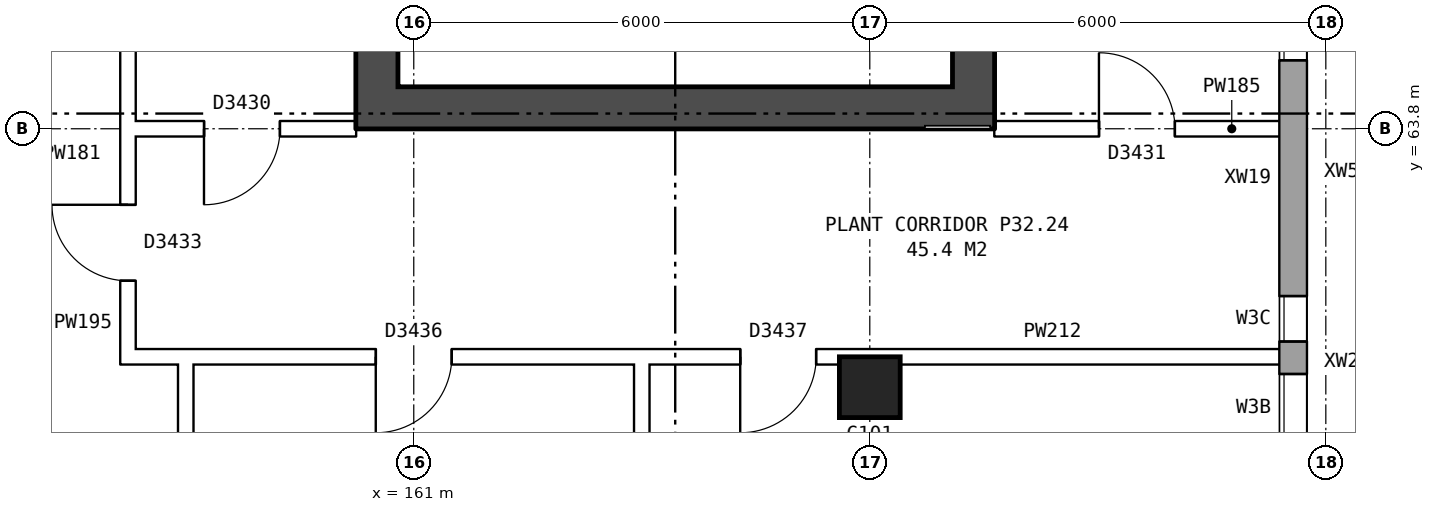
"""IFC4 building model, lengths in metres.
Left out: names, types, materials, properties, quantities, classifications, styles, units other than length and angle.
Written with IfcOpenShell. Run it as: python <this file> out.ifc"""

import sys

from ifc_helpers import new_model, si_unit, direction, frame, frame_2d, origin, origin_2d, place, context, subcontext, project, spatial, rectangle, extrude, element, fill, save


model = new_model("IFC4")
c1 = context("Model", 3, precision=1e-05, world=origin(), true_north=direction((0.0, 1.0)))
c2 = subcontext(c1, "Body", "Model", "MODEL_VIEW")
j1 = project(units=[si_unit("LENGTHUNIT", "METRE"), si_unit("PLANEANGLEUNIT", "RADIAN")], contexts=[c1])
p1 = place(None, origin())
s1 = spatial("IfcSite", under=j1, at=p1, CompositionType="ELEMENT")
p2 = place(p1, origin())
s2 = spatial("IfcBuilding", under=s1, at=p2, CompositionType="ELEMENT")
p3 = place(p2, frame((0.0, 0.0, 115.0)))
s3 = spatial("IfcBuildingStorey", under=s2, at=p3, CompositionType="ELEMENT", Elevation=115.0)
p4 = place(p3, frame((167.0, 60.4, 0.0), z_axis=(0.0, 0.0, 1.0), x_axis=(1.0, 0.0, 0.0)))
e1 = element("IfcColumn", 1, at=p4, inside=s3, PredefinedType="COLUMN", context=c2, shape_type="SweptSolid", body=[
    extrude(rectangle(XDim=0.8, YDim=0.8, at=origin_2d()), origin(), (0.0, 0.0, 1.0), 4.2),
])
p5 = place(p3, frame((172.57, 57.075, 0.0), z_axis=(0.0, 0.0, 1.0), x_axis=(0.0, 1.0, 0.0)))
e2 = element("IfcWall", 2, at=p5, inside=s3, PredefinedType="STANDARD", context=c2, shape_type="SweptSolid", body=[
    extrude(rectangle(XDim=25.851, YDim=0.36, at=frame_2d((12.925, 0.0))), origin(), (0.0, 0.0, 1.0), 4.2),
])
p6 = place(p5, frame((2.6, 0.0, 1.5)))
e3 = element("IfcOpeningElement", 3, at=p6, cuts=e2, PredefinedType="OPENING", context=c2, shape_type="SweptSolid", body=[
    extrude(rectangle(XDim=0.9, YDim=1.2, at=frame_2d((0.45, 0.6))), frame((0.0, 0.19, 0.0), z_axis=(0.0, -1.0, 0.0), x_axis=(1.0, 0.0, 0.0)), (0.0, 0.0, 1.0), 0.38),
])
p7 = place(p5, frame((3.925, 0.0, 1.5)))
e4 = element("IfcOpeningElement", 4, at=p7, cuts=e2, PredefinedType="OPENING", context=c2, shape_type="SweptSolid", body=[
    extrude(rectangle(XDim=0.6, YDim=1.2, at=frame_2d((0.3, 0.6))), frame((0.0, 0.19, 0.0), z_axis=(0.0, -1.0, 0.0), x_axis=(1.0, 0.0, 0.0)), (0.0, 0.0, 1.0), 0.38),
])
p8 = place(p5, frame((7.625, 0.0, 1.5)))
e5 = element("IfcOpeningElement", 5, at=p8, cuts=e2, PredefinedType="OPENING", context=c2, shape_type="SweptSolid", body=[
    extrude(rectangle(XDim=1.6, YDim=1.2, at=frame_2d((0.8, 0.6))), frame((0.0, 0.19, 0.0), z_axis=(0.0, -1.0, 0.0), x_axis=(1.0, 0.0, 0.0)), (0.0, 0.0, 1.0), 0.38),
])
p9 = place(p5, frame((10.625, 0.0, 1.5)))
e6 = element("IfcOpeningElement", 6, at=p9, cuts=e2, PredefinedType="OPENING", context=c2, shape_type="SweptSolid", body=[
    extrude(rectangle(XDim=1.6, YDim=1.2, at=frame_2d((0.8, 0.6))), frame((0.0, 0.19, 0.0), z_axis=(0.0, -1.0, 0.0), x_axis=(1.0, 0.0, 0.0)), (0.0, 0.0, 1.0), 0.38),
])
p10 = place(p5, frame((9.525, 0.0, 1.5)))
e7 = element("IfcOpeningElement", 7, at=p10, cuts=e2, PredefinedType="OPENING", context=c2, shape_type="SweptSolid", body=[
    extrude(rectangle(XDim=0.6, YDim=1.2, at=frame_2d((0.3, 0.6))), frame((0.0, 0.19, 0.0), z_axis=(0.0, -1.0, 0.0), x_axis=(1.0, 0.0, 0.0)), (0.0, 0.0, 1.0), 0.38),
])
p11 = place(p5, frame((14.975, 0.0, 1.5)))
e8 = element("IfcOpeningElement", 8, at=p11, cuts=e2, PredefinedType="OPENING", context=c2, shape_type="SweptSolid", body=[
    extrude(rectangle(XDim=0.6, YDim=1.2, at=frame_2d((0.3, 0.6))), frame((0.0, 0.19, 0.0), z_axis=(0.0, -1.0, 0.0), x_axis=(1.0, 0.0, 0.0)), (0.0, 0.0, 1.0), 0.38),
])
p12 = place(p5, frame((19.625, 0.0, 1.5)))
e9 = element("IfcOpeningElement", 9, at=p12, cuts=e2, PredefinedType="OPENING", context=c2, shape_type="SweptSolid", body=[
    extrude(rectangle(XDim=1.6, YDim=1.2, at=frame_2d((0.8, 0.6))), frame((0.0, 0.19, 0.0), z_axis=(0.0, -1.0, 0.0), x_axis=(1.0, 0.0, 0.0)), (0.0, 0.0, 1.0), 0.38),
])
p13 = place(p5, frame((22.625, 0.0, 1.5)))
e10 = element("IfcOpeningElement", 10, at=p13, cuts=e2, PredefinedType="OPENING", context=c2, shape_type="SweptSolid", body=[
    extrude(rectangle(XDim=1.6, YDim=1.2, at=frame_2d((0.8, 0.6))), frame((0.0, 0.19, 0.0), z_axis=(0.0, -1.0, 0.0), x_axis=(1.0, 0.0, 0.0)), (0.0, 0.0, 1.0), 0.38),
])
p14 = place(p5, frame((15.875, 0.0, 1.5)))
e11 = element("IfcOpeningElement", 11, at=p14, cuts=e2, PredefinedType="OPENING", context=c2, shape_type="SweptSolid", body=[
    extrude(rectangle(XDim=1.2, YDim=1.2, at=frame_2d((0.6, 0.6))), frame((0.0, 0.19, 0.0), z_axis=(0.0, -1.0, 0.0), x_axis=(1.0, 0.0, 0.0)), (0.0, 0.0, 1.0), 0.38),
])
p15 = place(p3, frame((160.515, 76.2, 0.0), z_axis=(0.0, 0.0, 1.0), x_axis=(0.0, -1.0, 0.0)))
e12 = element("IfcWall", 12, at=p15, inside=s3, PredefinedType="SHEAR", context=c2, shape_type="SweptSolid", body=[
    extrude(rectangle(XDim=12.4, YDim=0.55, at=frame_2d((6.2, 0.0))), origin(), (0.0, 0.0, 1.0), 4.2),
])
p16 = place(p15, frame((1.325, 0.0, 0.0)))
e13 = element("IfcOpeningElement", 13, at=p16, cuts=e12, PredefinedType="OPENING", context=c2, shape_type="SweptSolid", body=[
    extrude(rectangle(XDim=1.1, YDim=2.1, at=frame_2d((0.55, 1.05))), frame((0.0, 0.285, 0.0), z_axis=(0.0, -1.0, 0.0), x_axis=(1.0, 0.0, 0.0)), (0.0, 0.0, 1.0), 0.57),
])
p17 = place(p15, frame((9.9, 0.0, 0.0)))
e14 = element("IfcOpeningElement", 14, at=p17, cuts=e12, PredefinedType="OPENING", context=c2, shape_type="SweptSolid", body=[
    extrude(rectangle(XDim=1.1, YDim=2.1, at=frame_2d((0.55, 1.05))), frame((0.0, 0.285, 0.0), z_axis=(0.0, -1.0, 0.0), x_axis=(1.0, 0.0, 0.0)), (0.0, 0.0, 1.0), 0.57),
])
p18 = place(p15, frame((8.125, 0.0, 0.0)))
e15 = element("IfcOpeningElement", 15, at=p18, cuts=e12, PredefinedType="OPENING", context=c2, shape_type="SweptSolid", body=[
    extrude(rectangle(XDim=0.85, YDim=2.1, at=frame_2d((0.425, 1.05))), frame((0.0, 0.285, 0.0), z_axis=(0.0, -1.0, 0.0), x_axis=(1.0, 0.0, 0.0)), (0.0, 0.0, 1.0), 0.57),
])
p19 = place(p3, frame((168.365, 76.2, 0.0), z_axis=(0.0, 0.0, 1.0), x_axis=(0.0, -1.0, 0.0)))
e16 = element("IfcWall", 16, at=p19, inside=s3, PredefinedType="SHEAR", context=c2, shape_type="SweptSolid", body=[
    extrude(rectangle(XDim=12.4, YDim=0.55, at=frame_2d((6.2, 0.0))), origin(), (0.0, 0.0, 1.0), 4.2),
])
p20 = place(p3, frame((160.79, 64.075, 0.0), z_axis=(0.0, 0.0, 1.0), x_axis=(1.0, 0.0, 0.0)))
e17 = element("IfcWall", 17, at=p20, inside=s3, PredefinedType="SHEAR", context=c2, shape_type="SweptSolid", body=[
    extrude(rectangle(XDim=7.3, YDim=0.55, at=frame_2d((3.65, 0.0))), origin(), (0.0, 0.0, 1.0), 4.2),
])
p21 = place(p3, frame((157.24, 63.9, 0.0), z_axis=(0.0, 0.0, 1.0), x_axis=(0.0, 1.0, 0.0)))
e18 = element("IfcWall", 18, at=p21, inside=s3, PredefinedType="PARTITIONING", context=c2, shape_type="SweptSolid", body=[
    extrude(rectangle(XDim=12.2, YDim=0.2, at=frame_2d((6.1, 0.0))), origin(), (0.0, 0.0, 1.0), 4.2),
])
p22 = place(p21, frame((5.1, 0.0, 0.0)))
e19 = element("IfcOpeningElement", 19, at=p22, cuts=e18, PredefinedType="OPENING", context=c2, shape_type="SweptSolid", body=[
    extrude(rectangle(XDim=2.0, YDim=2.1, at=frame_2d((1.0, 1.05))), frame((0.0, 0.11, 0.0), z_axis=(0.0, -1.0, 0.0), x_axis=(1.0, 0.0, 0.0)), (0.0, 0.0, 1.0), 0.22),
])
p23 = place(p3, frame((157.14, 60.8, 0.0), z_axis=(0.0, 0.0, 1.0), x_axis=(1.0, 0.0, 0.0)))
e20 = element("IfcWall", 20, at=p23, inside=s3, PredefinedType="PARTITIONING", context=c2, shape_type="SweptSolid", body=[
    extrude(rectangle(XDim=15.37, YDim=0.2, at=frame_2d((7.685, 0.0))), origin(), (0.0, 0.0, 1.0), 4.2),
])
p24 = place(p23, frame((3.36, 0.0, 0.0)))
e21 = element("IfcOpeningElement", 21, at=p24, cuts=e20, PredefinedType="OPENING", context=c2, shape_type="SweptSolid", body=[
    extrude(rectangle(XDim=1.0, YDim=2.1, at=frame_2d((0.5, 1.05))), frame((0.0, 0.11, 0.0), z_axis=(0.0, -1.0, 0.0), x_axis=(1.0, 0.0, 0.0)), (0.0, 0.0, 1.0), 0.22),
])
p25 = place(p23, frame((8.155, 0.0, 0.0)))
e22 = element("IfcOpeningElement", 22, at=p25, cuts=e20, PredefinedType="OPENING", context=c2, shape_type="SweptSolid", body=[
    extrude(rectangle(XDim=1.0, YDim=2.1, at=frame_2d((0.5, 1.05))), frame((0.0, 0.11, 0.0), z_axis=(0.0, -1.0, 0.0), x_axis=(1.0, 0.0, 0.0)), (0.0, 0.0, 1.0), 0.22),
])
p26 = place(p3, frame((168.64, 63.8, 0.0), z_axis=(0.0, 0.0, 1.0), x_axis=(1.0, 0.0, 0.0)))
e23 = element("IfcWall", 23, at=p26, inside=s3, PredefinedType="PARTITIONING", context=c2, shape_type="SweptSolid", body=[
    extrude(rectangle(XDim=3.87, YDim=0.2, at=frame_2d((1.935, 0.0))), origin(), (0.0, 0.0, 1.0), 4.2),
])
p27 = place(p26, frame((1.375, 0.0, 0.0)))
e24 = element("IfcOpeningElement", 24, at=p27, cuts=e23, PredefinedType="OPENING", context=c2, shape_type="SweptSolid", body=[
    extrude(rectangle(XDim=1.0, YDim=2.1, at=frame_2d((0.5, 1.05))), frame((0.0, 0.11, 0.0), z_axis=(0.0, -1.0, 0.0), x_axis=(1.0, 0.0, 0.0)), (0.0, 0.0, 1.0), 0.22),
])
p28 = place(p3, frame((157.14, 63.8, 0.0), z_axis=(0.0, 0.0, 1.0), x_axis=(1.0, 0.0, 0.0)))
e25 = element("IfcWall", 25, at=p28, inside=s3, PredefinedType="PARTITIONING", context=c2, shape_type="SweptSolid", body=[
    extrude(rectangle(XDim=3.1, YDim=0.2, at=frame_2d((1.55, 0.0))), origin(), (0.0, 0.0, 1.0), 4.2),
])
p29 = place(p28, frame((1.1, 0.0, 0.0)))
e26 = element("IfcOpeningElement", 26, at=p29, cuts=e25, PredefinedType="OPENING", context=c2, shape_type="SweptSolid", body=[
    extrude(rectangle(XDim=1.0, YDim=2.1, at=frame_2d((0.5, 1.05))), frame((0.0, 0.11, 0.0), z_axis=(0.0, -1.0, 0.0), x_axis=(1.0, 0.0, 0.0)), (0.0, 0.0, 1.0), 0.22),
])
p30 = place(p3, frame((157.24, 60.7, 0.0), z_axis=(0.0, 0.0, 1.0), x_axis=(0.0, 1.0, 0.0)))
e27 = element("IfcWall", 27, at=p30, inside=s3, PredefinedType="PARTITIONING", context=c2, shape_type="SweptSolid", body=[
    extrude(rectangle(XDim=3.2, YDim=0.2, at=frame_2d((1.6, 0.0))), origin(), (0.0, 0.0, 1.0), 4.2),
])
p31 = place(p30, frame((1.1, 0.0, 0.0)))
e28 = element("IfcOpeningElement", 28, at=p31, cuts=e27, PredefinedType="OPENING", context=c2, shape_type="SweptSolid", body=[
    extrude(rectangle(XDim=1.0, YDim=2.1, at=frame_2d((0.5, 1.05))), frame((0.0, 0.11, 0.0), z_axis=(0.0, -1.0, 0.0), x_axis=(1.0, 0.0, 0.0)), (0.0, 0.0, 1.0), 0.22),
])
for number, where, z_axis, x_axis in (
    (29, (158.0, 54.24, 0.0), (0.0, 0.0, 1.0), (0.0, 1.0, 0.0)),
    (30, (164.0, 54.24, 0.0), (0.0, 0.0, 1.0), (0.0, 1.0, 0.0)),
):
    element("IfcWall", number, at=place(p3, frame(where, z_axis=z_axis, x_axis=x_axis)), inside=s3, PredefinedType="PARTITIONING", context=c2, shape_type="SweptSolid", body=[
        extrude(rectangle(XDim=6.66, YDim=0.2, at=frame_2d((3.33, 0.0))), origin(), (0.0, 0.0, 1.0), 4.2),
    ])
p32 = place(p6, origin())
e31 = element("IfcWindow", 31, at=p32, inside=s3, PartitioningType="DOUBLE_PANEL_HORIZONTAL", PredefinedType="WINDOW", context=c2, shape_type="SweptSolid", body=[
    extrude(rectangle(XDim=0.9, YDim=1.2, at=frame_2d((0.45, 0.6))), frame((0.0, 0.15, 0.0), z_axis=(0.0, -1.0, 0.0), x_axis=(1.0, 0.0, 0.0)), (0.0, 0.0, 1.0), 0.06),
])
fill(e3, e31)
p33 = place(p7, origin())
e32 = element("IfcWindow", 32, at=p33, inside=s3, PartitioningType="DOUBLE_PANEL_HORIZONTAL", PredefinedType="WINDOW", context=c2, shape_type="SweptSolid", body=[
    extrude(rectangle(XDim=0.6, YDim=1.2, at=frame_2d((0.3, 0.6))), frame((0.0, 0.15, 0.0), z_axis=(0.0, -1.0, 0.0), x_axis=(1.0, 0.0, 0.0)), (0.0, 0.0, 1.0), 0.06),
])
fill(e4, e32)
p34 = place(p8, origin())
e33 = element("IfcWindow", 33, at=p34, inside=s3, PartitioningType="DOUBLE_PANEL_HORIZONTAL", PredefinedType="WINDOW", context=c2, shape_type="SweptSolid", body=[
    extrude(rectangle(XDim=1.6, YDim=1.2, at=frame_2d((0.8, 0.6))), frame((0.0, 0.15, 0.0), z_axis=(0.0, -1.0, 0.0), x_axis=(1.0, 0.0, 0.0)), (0.0, 0.0, 1.0), 0.06),
])
fill(e5, e33)
p35 = place(p24, frame((1.0, 0.0, 0.0), z_axis=(0.0, 0.0, 1.0), x_axis=(-1.0, 0.0, 0.0)))
e34 = element("IfcDoor", 34, at=p35, inside=s3, OperationType="SINGLE_SWING_RIGHT", PredefinedType="DOOR", context=c2, shape_type="SweptSolid", body=[
    extrude(rectangle(XDim=1.0, YDim=2.1, at=frame_2d((0.5, 1.05))), frame((0.0, 0.025, 0.0), z_axis=(0.0, -1.0, 0.0), x_axis=(1.0, 0.0, 0.0)), (0.0, 0.0, 1.0), 0.05),
])
fill(e21, e34)
p36 = place(p25, frame((1.0, 0.0, 0.0), z_axis=(0.0, 0.0, 1.0), x_axis=(-1.0, 0.0, 0.0)))
e35 = element("IfcDoor", 35, at=p36, inside=s3, OperationType="SINGLE_SWING_RIGHT", PredefinedType="DOOR", context=c2, shape_type="SweptSolid", body=[
    extrude(rectangle(XDim=1.0, YDim=2.1, at=frame_2d((0.5, 1.05))), frame((0.0, 0.025, 0.0), z_axis=(0.0, -1.0, 0.0), x_axis=(1.0, 0.0, 0.0)), (0.0, 0.0, 1.0), 0.05),
])
fill(e22, e35)
p37 = place(p27, origin())
e36 = element("IfcDoor", 36, at=p37, inside=s3, OperationType="SINGLE_SWING_LEFT", PredefinedType="DOOR", context=c2, shape_type="SweptSolid", body=[
    extrude(rectangle(XDim=1.0, YDim=2.1, at=frame_2d((0.5, 1.05))), frame((0.0, 0.025, 0.0), z_axis=(0.0, -1.0, 0.0), x_axis=(1.0, 0.0, 0.0)), (0.0, 0.0, 1.0), 0.05),
])
fill(e24, e36)
p38 = place(p29, frame((1.0, 0.0, 0.0), z_axis=(0.0, 0.0, 1.0), x_axis=(-1.0, 0.0, 0.0)))
e37 = element("IfcDoor", 37, at=p38, inside=s3, OperationType="SINGLE_SWING_RIGHT", PredefinedType="DOOR", context=c2, shape_type="SweptSolid", body=[
    extrude(rectangle(XDim=1.0, YDim=2.1, at=frame_2d((0.5, 1.05))), frame((0.0, 0.025, 0.0), z_axis=(0.0, -1.0, 0.0), x_axis=(1.0, 0.0, 0.0)), (0.0, 0.0, 1.0), 0.05),
])
fill(e26, e37)
p39 = place(p31, origin())
e38 = element("IfcDoor", 38, at=p39, inside=s3, OperationType="SINGLE_SWING_RIGHT", PredefinedType="DOOR", context=c2, shape_type="SweptSolid", body=[
    extrude(rectangle(XDim=1.0, YDim=2.1, at=frame_2d((0.5, 1.05))), frame((0.0, 0.025, 0.0), z_axis=(0.0, -1.0, 0.0), x_axis=(1.0, 0.0, 0.0)), (0.0, 0.0, 1.0), 0.05),
])
fill(e28, e38)
save(model, sys.argv[1])
